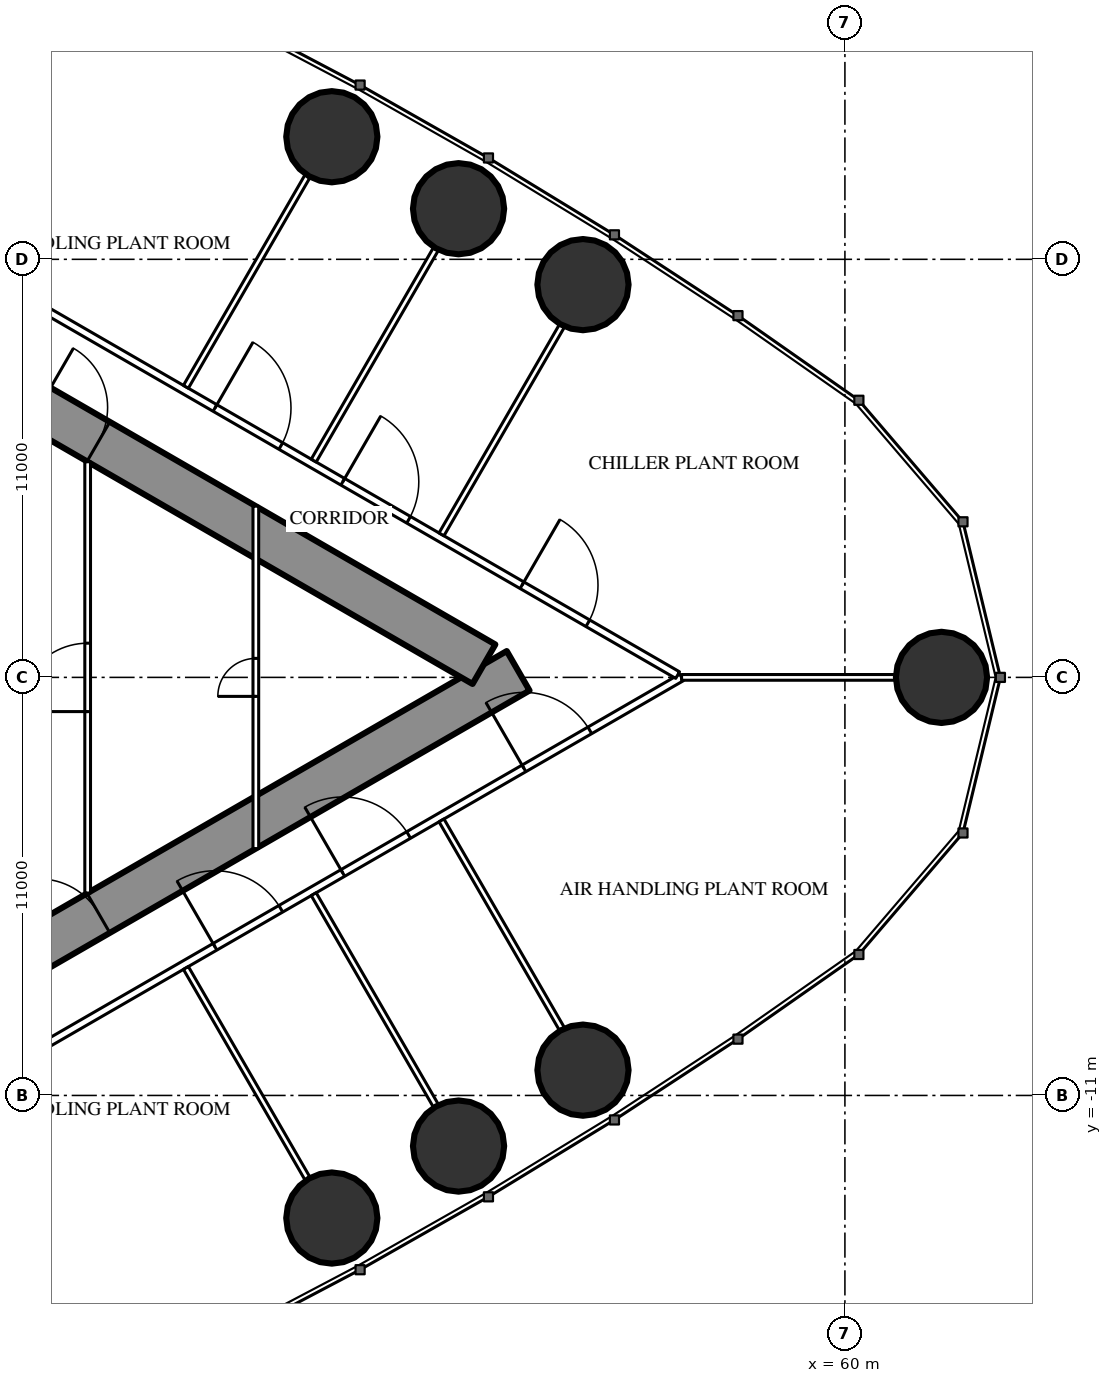
"""IFC4 building model, lengths in metres.
Left out: names, types, materials, properties, quantities, classifications, styles, units other than length and angle.
Written with IfcOpenShell. Run it as: python <this file> out.ifc"""

import sys

from ifc_helpers import new_model, si_unit, direction, frame, frame_2d, origin, origin_2d, place, context, subcontext, project, spatial, rectangle, circle, extrude, element, fill, save


model = new_model("IFC4")
c1 = context("Model", 3, precision=1e-05, world=origin(), true_north=direction((0.0, 1.0)))
c2 = subcontext(c1, "Body", "Model", "MODEL_VIEW")
j1 = project(units=[si_unit("LENGTHUNIT", "METRE"), si_unit("PLANEANGLEUNIT", "RADIAN")], contexts=[c1])
p1 = place(None, origin())
s1 = spatial("IfcSite", under=j1, at=p1, CompositionType="ELEMENT")
p2 = place(p1, origin())
s2 = spatial("IfcBuilding", under=s1, at=p2, CompositionType="ELEMENT")
p3 = place(p2, frame((0.0, 0.0, 263.3)))
s3 = spatial("IfcBuildingStorey", under=s2, at=p3, CompositionType="ELEMENT", Elevation=263.3)
for number, where, z_axis, x_axis in (
    (1, (62.542, 0.0, 0.0), (0.0, 0.0, 1.0), (1.0, 0.0, 0.0)),
    (2, (53.108, 10.334, 0.0), (0.0, 0.0, 1.0), (1.0, 0.0, 0.0)),
    (3, (49.834, 12.332, 0.0), (0.0, 0.0, 1.0), (1.0, 0.0, 0.0)),
    (4, (46.499, 14.226, 0.0), (0.0, 0.0, 1.0), (1.0, 0.0, 0.0)),
    (5, (46.499, -14.226, 0.0), (0.0, 0.0, 1.0), (1.0, 0.0, 0.0)),
    (6, (49.834, -12.332, 0.0), (0.0, 0.0, 1.0), (1.0, 0.0, 0.0)),
    (7, (53.108, -10.334, 0.0), (0.0, 0.0, 1.0), (1.0, 0.0, 0.0)),
):
    element("IfcColumn", number, at=place(p3, frame(where, z_axis=z_axis, x_axis=x_axis)), inside=s3, PredefinedType="COLUMN", context=c2, shape_type="SweptSolid", body=[
        extrude(circle(Radius=1.2, at=origin_2d()), origin(), (0.0, 0.0, 1.0), 5.0),
    ])
p4 = place(p3, frame((27.2, -13.8, 0.0), z_axis=(0.0, 0.0, 1.0), x_axis=(0.866027159892, 0.499996958321, 0.0)))
e8 = element("IfcWall", 8, at=p4, inside=s3, PredefinedType="SHEAR", context=c2, shape_type="SweptSolid", body=[
    extrude(rectangle(XDim=27.947, YDim=1.2, at=frame_2d((13.973, 0.0))), origin(), (0.0, 0.0, 1.0), 5.0),
])
p5 = place(p4, frame((4.6, 0.0, 0.0)))
e9 = element("IfcOpeningElement", 9, at=p5, cuts=e8, PredefinedType="OPENING", context=c2, shape_type="SweptSolid", body=[
    extrude(rectangle(XDim=1.0, YDim=2.2, at=frame_2d((0.5, 1.1))), frame((0.0, 0.61, 0.0), z_axis=(0.0, -1.0, 0.0), x_axis=(1.0, 0.0, 0.0)), (0.0, 0.0, 1.0), 1.22),
])
p6 = place(p4, frame((13.395, 0.0, 0.0)))
e10 = element("IfcOpeningElement", 10, at=p6, cuts=e8, PredefinedType="OPENING", context=c2, shape_type="SweptSolid", body=[
    extrude(rectangle(XDim=1.8, YDim=2.2, at=frame_2d((0.9, 1.1))), frame((0.0, 0.61, 0.0), z_axis=(0.0, -1.0, 0.0), x_axis=(1.0, 0.0, 0.0)), (0.0, 0.0, 1.0), 1.22),
])
p7 = place(p3, frame((27.2, 13.8, 0.0), z_axis=(0.0, 0.0, 1.0), x_axis=(0.866024515034, -0.500001539357, 0.0)))
e11 = element("IfcWall", 11, at=p7, inside=s3, PredefinedType="SHEAR", context=c2, shape_type="SweptSolid", body=[
    extrude(rectangle(XDim=26.907, YDim=1.2, at=frame_2d((13.454, 0.0))), origin(), (0.0, 0.0, 1.0), 5.0),
])
p8 = place(p7, frame((4.6, 0.0, 0.0)))
e12 = element("IfcOpeningElement", 12, at=p8, cuts=e11, PredefinedType="OPENING", context=c2, shape_type="SweptSolid", body=[
    extrude(rectangle(XDim=1.0, YDim=2.2, at=frame_2d((0.5, 1.1))), frame((0.0, 0.61, 0.0), z_axis=(0.0, -1.0, 0.0), x_axis=(1.0, 0.0, 0.0)), (0.0, 0.0, 1.0), 1.22),
])
p9 = place(p7, frame((13.395, 0.0, 0.0)))
e13 = element("IfcOpeningElement", 13, at=p9, cuts=e11, PredefinedType="OPENING", context=c2, shape_type="SweptSolid", body=[
    extrude(rectangle(XDim=1.8, YDim=2.2, at=frame_2d((0.9, 1.1))), frame((0.0, 0.61, 0.0), z_axis=(0.0, -1.0, 0.0), x_axis=(1.0, 0.0, 0.0)), (0.0, 0.0, 1.0), 1.22),
])
p10 = place(p3, frame((28.959, -15.44, 0.0), z_axis=(0.0, 0.0, 1.0), x_axis=(0.866025227435, 0.500000305447, 0.0)))
e14 = element("IfcWall", 14, at=p10, inside=s3, PredefinedType="PARTITIONING", context=c2, shape_type="SweptSolid", body=[
    extrude(rectangle(XDim=30.88, YDim=0.2, at=frame_2d((15.44, 0.0))), origin(), (0.0, 0.0, 1.0), 4.75),
])
p11 = place(p10, frame((6.994, 0.0, 0.0)))
e15 = element("IfcOpeningElement", 15, at=p11, cuts=e14, PredefinedType="OPENING", context=c2, shape_type="SweptSolid", body=[
    extrude(rectangle(XDim=2.0, YDim=2.4, at=frame_2d((1.0, 1.2))), frame((0.0, 0.11, 0.0), z_axis=(0.0, -1.0, 0.0), x_axis=(1.0, 0.0, 0.0)), (0.0, 0.0, 1.0), 0.22),
])
p12 = place(p10, frame((16.704, 0.0, 0.0)))
e16 = element("IfcOpeningElement", 16, at=p12, cuts=e14, PredefinedType="OPENING", context=c2, shape_type="SweptSolid", body=[
    extrude(rectangle(XDim=2.0, YDim=2.4, at=frame_2d((1.0, 1.2))), frame((0.0, 0.11, 0.0), z_axis=(0.0, -1.0, 0.0), x_axis=(1.0, 0.0, 0.0)), (0.0, 0.0, 1.0), 0.22),
])
p13 = place(p10, frame((20.587, 0.0, 0.0)))
e17 = element("IfcOpeningElement", 17, at=p13, cuts=e14, PredefinedType="OPENING", context=c2, shape_type="SweptSolid", body=[
    extrude(rectangle(XDim=2.0, YDim=2.4, at=frame_2d((1.0, 1.2))), frame((0.0, 0.11, 0.0), z_axis=(0.0, -1.0, 0.0), x_axis=(1.0, 0.0, 0.0)), (0.0, 0.0, 1.0), 0.22),
])
p14 = place(p10, frame((26.092, 0.0, 0.0)))
e18 = element("IfcOpeningElement", 18, at=p14, cuts=e14, PredefinedType="OPENING", context=c2, shape_type="SweptSolid", body=[
    extrude(rectangle(XDim=2.0, YDim=2.4, at=frame_2d((1.0, 1.2))), frame((0.0, 0.11, 0.0), z_axis=(0.0, -1.0, 0.0), x_axis=(1.0, 0.0, 0.0)), (0.0, 0.0, 1.0), 0.22),
])
p15 = place(p3, frame((28.959, 15.44, 0.0), z_axis=(0.0, 0.0, 1.0), x_axis=(0.866027378611, -0.499996579484, 0.0)))
e19 = element("IfcWall", 19, at=p15, inside=s3, PredefinedType="PARTITIONING", context=c2, shape_type="SweptSolid", body=[
    extrude(rectangle(XDim=30.76, YDim=0.2, at=frame_2d((15.38, 0.0))), origin(), (0.0, 0.0, 1.0), 4.75),
])
p16 = place(p15, frame((26.032, 0.0, 0.0)))
e20 = element("IfcOpeningElement", 20, at=p16, cuts=e19, PredefinedType="OPENING", context=c2, shape_type="SweptSolid", body=[
    extrude(rectangle(XDim=2.0, YDim=2.4, at=frame_2d((1.0, 1.2))), frame((0.0, 0.11, 0.0), z_axis=(0.0, -1.0, 0.0), x_axis=(1.0, 0.0, 0.0)), (0.0, 0.0, 1.0), 0.22),
])
p17 = place(p15, frame((20.587, 0.0, 0.0)))
e21 = element("IfcOpeningElement", 21, at=p17, cuts=e19, PredefinedType="OPENING", context=c2, shape_type="SweptSolid", body=[
    extrude(rectangle(XDim=2.0, YDim=2.4, at=frame_2d((1.0, 1.2))), frame((0.0, 0.11, 0.0), z_axis=(0.0, -1.0, 0.0), x_axis=(1.0, 0.0, 0.0)), (0.0, 0.0, 1.0), 0.22),
])
p18 = place(p15, frame((16.704, 0.0, 0.0)))
e22 = element("IfcOpeningElement", 22, at=p18, cuts=e19, PredefinedType="OPENING", context=c2, shape_type="SweptSolid", body=[
    extrude(rectangle(XDim=2.0, YDim=2.4, at=frame_2d((1.0, 1.2))), frame((0.0, 0.11, 0.0), z_axis=(0.0, -1.0, 0.0), x_axis=(1.0, 0.0, 0.0)), (0.0, 0.0, 1.0), 0.22),
])
p19 = place(p15, frame((6.994, 0.0, 0.0)))
e23 = element("IfcOpeningElement", 23, at=p19, cuts=e19, PredefinedType="OPENING", context=c2, shape_type="SweptSolid", body=[
    extrude(rectangle(XDim=2.0, YDim=2.4, at=frame_2d((1.0, 1.2))), frame((0.0, 0.11, 0.0), z_axis=(0.0, -1.0, 0.0), x_axis=(1.0, 0.0, 0.0)), (0.0, 0.0, 1.0), 0.22),
])
p20 = place(p3, frame((42.66, -7.646, 0.0), z_axis=(0.0, 0.0, 1.0), x_axis=(0.499996592859, -0.866027370889, 0.0)))
e24 = element("IfcWall", 24, at=p20, inside=s3, PredefinedType="PARTITIONING", context=c2, shape_type="SweptSolid", body=[
    extrude(rectangle(XDim=6.398, YDim=0.15, at=frame_2d((3.199, 0.0))), origin(), (0.0, 0.0, 1.0), 3.85),
])
p21 = place(p3, frame((46.023, -5.704, 0.0), z_axis=(0.0, 0.0, 1.0), x_axis=(0.499984478165, -0.866034365135, 0.0)))
e25 = element("IfcWall", 25, at=p21, inside=s3, PredefinedType="PARTITIONING", context=c2, shape_type="SweptSolid", body=[
    extrude(rectangle(XDim=6.426, YDim=0.15, at=frame_2d((3.213, 0.0))), origin(), (0.0, 0.0, 1.0), 3.85),
])
p22 = place(p3, frame((49.385, -3.763, 0.0), z_axis=(0.0, 0.0, 1.0), x_axis=(0.499999447814, -0.866025722589, 0.0)))
e26 = element("IfcWall", 26, at=p22, inside=s3, PredefinedType="PARTITIONING", context=c2, shape_type="SweptSolid", body=[
    extrude(rectangle(XDim=6.333, YDim=0.15, at=frame_2d((3.166, 0.0))), origin(), (0.0, 0.0, 1.0), 3.85),
])
p23 = place(p3, frame((42.66, 7.646, 0.0), z_axis=(0.0, 0.0, 1.0), x_axis=(0.499996592859, 0.866027370889, 0.0)))
e27 = element("IfcWall", 27, at=p23, inside=s3, PredefinedType="PARTITIONING", context=c2, shape_type="SweptSolid", body=[
    extrude(rectangle(XDim=6.398, YDim=0.15, at=frame_2d((3.199, 0.0))), origin(), (0.0, 0.0, 1.0), 3.85),
])
p24 = place(p3, frame((46.023, 5.704, 0.0), z_axis=(0.0, 0.0, 1.0), x_axis=(0.499984478165, 0.866034365135, 0.0)))
e28 = element("IfcWall", 28, at=p24, inside=s3, PredefinedType="PARTITIONING", context=c2, shape_type="SweptSolid", body=[
    extrude(rectangle(XDim=6.426, YDim=0.15, at=frame_2d((3.213, 0.0))), origin(), (0.0, 0.0, 1.0), 3.85),
])
p25 = place(p3, frame((49.385, 3.763, 0.0), z_axis=(0.0, 0.0, 1.0), x_axis=(0.499999447814, 0.866025722589, 0.0)))
e29 = element("IfcWall", 29, at=p25, inside=s3, PredefinedType="PARTITIONING", context=c2, shape_type="SweptSolid", body=[
    extrude(rectangle(XDim=6.333, YDim=0.15, at=frame_2d((3.166, 0.0))), origin(), (0.0, 0.0, 1.0), 3.85),
])
p26 = place(p3, frame((55.702, 0.0, 0.0), z_axis=(0.0, 0.0, 1.0), x_axis=(1.0, 0.0, 0.0)))
e30 = element("IfcWall", 30, at=p26, inside=s3, PredefinedType="PARTITIONING", context=c2, shape_type="SweptSolid", body=[
    extrude(rectangle(XDim=5.619, YDim=0.15, at=frame_2d((2.81, 0.0))), origin(), (0.0, 0.0, 1.0), 3.85),
])
p27 = place(p3, frame((40.075, -5.674, 0.0), z_axis=(0.0, 0.0, 1.0), x_axis=(0.0, 1.0, 0.0)))
e31 = element("IfcWall", 31, at=p27, inside=s3, PredefinedType="PARTITIONING", context=c2, shape_type="SweptSolid", body=[
    extrude(rectangle(XDim=11.348, YDim=0.15, at=frame_2d((5.674, 0.0))), origin(), (0.0, 0.0, 1.0), 4.75),
])
p28 = place(p27, frame((4.774, 0.0, 0.0)))
e32 = element("IfcOpeningElement", 32, at=p28, cuts=e31, PredefinedType="OPENING", context=c2, shape_type="SweptSolid", body=[
    extrude(rectangle(XDim=1.8, YDim=2.2, at=frame_2d((0.9, 1.1))), frame((0.0, 0.085, 0.0), z_axis=(0.0, -1.0, 0.0), x_axis=(1.0, 0.0, 0.0)), (0.0, 0.0, 1.0), 0.17),
])
p29 = place(p3, frame((44.5, -4.505, 0.0), z_axis=(0.0, 0.0, 1.0), x_axis=(0.0, 1.0, 0.0)))
e33 = element("IfcWall", 33, at=p29, inside=s3, PredefinedType="PARTITIONING", context=c2, shape_type="SweptSolid", body=[
    extrude(rectangle(XDim=9.009, YDim=0.15, at=frame_2d((4.505, 0.0))), origin(), (0.0, 0.0, 1.0), 4.75),
])
p30 = place(p29, frame((4.005, 0.0, 0.0)))
e34 = element("IfcOpeningElement", 34, at=p30, cuts=e33, PredefinedType="OPENING", context=c2, shape_type="SweptSolid", body=[
    extrude(rectangle(XDim=1.0, YDim=2.2, at=frame_2d((0.5, 1.1))), frame((0.0, 0.085, 0.0), z_axis=(0.0, -1.0, 0.0), x_axis=(1.0, 0.0, 0.0)), (0.0, 0.0, 1.0), 0.17),
])
p31 = place(p12, origin())
e35 = element("IfcDoor", 35, at=p31, inside=s3, OperationType="DOUBLE_DOOR_SINGLE_SWING", PredefinedType="DOOR", context=c2, shape_type="SweptSolid", body=[
    extrude(rectangle(XDim=2.0, YDim=2.4, at=frame_2d((1.0, 1.2))), frame((0.0, 0.025, 0.0), z_axis=(0.0, -1.0, 0.0), x_axis=(1.0, 0.0, 0.0)), (0.0, 0.0, 1.0), 0.05),
])
fill(e16, e35)
p32 = place(p13, origin())
e36 = element("IfcDoor", 36, at=p32, inside=s3, OperationType="DOUBLE_DOOR_SINGLE_SWING", PredefinedType="DOOR", context=c2, shape_type="SweptSolid", body=[
    extrude(rectangle(XDim=2.0, YDim=2.4, at=frame_2d((1.0, 1.2))), frame((0.0, 0.025, 0.0), z_axis=(0.0, -1.0, 0.0), x_axis=(1.0, 0.0, 0.0)), (0.0, 0.0, 1.0), 0.05),
])
fill(e17, e36)
p33 = place(p14, origin())
e37 = element("IfcDoor", 37, at=p33, inside=s3, OperationType="DOUBLE_DOOR_SINGLE_SWING", PredefinedType="DOOR", context=c2, shape_type="SweptSolid", body=[
    extrude(rectangle(XDim=2.0, YDim=2.4, at=frame_2d((1.0, 1.2))), frame((0.0, 0.025, 0.0), z_axis=(0.0, -1.0, 0.0), x_axis=(1.0, 0.0, 0.0)), (0.0, 0.0, 1.0), 0.05),
])
fill(e18, e37)
p34 = place(p16, origin())
e38 = element("IfcDoor", 38, at=p34, inside=s3, OperationType="DOUBLE_DOOR_SINGLE_SWING", PredefinedType="DOOR", context=c2, shape_type="SweptSolid", body=[
    extrude(rectangle(XDim=2.0, YDim=2.4, at=frame_2d((1.0, 1.2))), frame((0.0, 0.025, 0.0), z_axis=(0.0, -1.0, 0.0), x_axis=(1.0, 0.0, 0.0)), (0.0, 0.0, 1.0), 0.05),
])
fill(e20, e38)
p35 = place(p17, origin())
e39 = element("IfcDoor", 39, at=p35, inside=s3, OperationType="DOUBLE_DOOR_SINGLE_SWING", PredefinedType="DOOR", context=c2, shape_type="SweptSolid", body=[
    extrude(rectangle(XDim=2.0, YDim=2.4, at=frame_2d((1.0, 1.2))), frame((0.0, 0.025, 0.0), z_axis=(0.0, -1.0, 0.0), x_axis=(1.0, 0.0, 0.0)), (0.0, 0.0, 1.0), 0.05),
])
fill(e21, e39)
p36 = place(p18, origin())
e40 = element("IfcDoor", 40, at=p36, inside=s3, OperationType="DOUBLE_DOOR_SINGLE_SWING", PredefinedType="DOOR", context=c2, shape_type="SweptSolid", body=[
    extrude(rectangle(XDim=2.0, YDim=2.4, at=frame_2d((1.0, 1.2))), frame((0.0, 0.025, 0.0), z_axis=(0.0, -1.0, 0.0), x_axis=(1.0, 0.0, 0.0)), (0.0, 0.0, 1.0), 0.05),
])
fill(e22, e40)
p37 = place(p28, origin())
e41 = element("IfcDoor", 41, at=p37, inside=s3, OperationType="DOUBLE_DOOR_SINGLE_SWING", PredefinedType="DOOR", context=c2, shape_type="SweptSolid", body=[
    extrude(rectangle(XDim=1.8, YDim=2.2, at=frame_2d((0.9, 1.1))), frame((0.0, 0.025, 0.0), z_axis=(0.0, -1.0, 0.0), x_axis=(1.0, 0.0, 0.0)), (0.0, 0.0, 1.0), 0.05),
])
fill(e32, e41)
p38 = place(p30, origin())
e42 = element("IfcDoor", 42, at=p38, inside=s3, OperationType="SINGLE_SWING_LEFT", PredefinedType="DOOR", context=c2, shape_type="SweptSolid", body=[
    extrude(rectangle(XDim=1.0, YDim=2.2, at=frame_2d((0.5, 1.1))), frame((0.0, 0.025, 0.0), z_axis=(0.0, -1.0, 0.0), x_axis=(1.0, 0.0, 0.0)), (0.0, 0.0, 1.0), 0.05),
])
fill(e34, e42)
p39 = place(p6, origin())
e43 = element("IfcDoor", 43, at=p39, inside=s3, OperationType="DOUBLE_DOOR_SINGLE_SWING", PredefinedType="DOOR", context=c2, shape_type="SweptSolid", body=[
    extrude(rectangle(XDim=1.8, YDim=2.2, at=frame_2d((0.9, 1.1))), frame((0.0, 0.025, 0.0), z_axis=(0.0, -1.0, 0.0), x_axis=(1.0, 0.0, 0.0)), (0.0, 0.0, 1.0), 0.05),
])
fill(e10, e43)
p40 = place(p9, origin())
e44 = element("IfcDoor", 44, at=p40, inside=s3, OperationType="DOUBLE_DOOR_SINGLE_SWING", PredefinedType="DOOR", context=c2, shape_type="SweptSolid", body=[
    extrude(rectangle(XDim=1.8, YDim=2.2, at=frame_2d((0.9, 1.1))), frame((0.0, 0.025, 0.0), z_axis=(0.0, -1.0, 0.0), x_axis=(1.0, 0.0, 0.0)), (0.0, 0.0, 1.0), 0.05),
])
fill(e13, e44)
save(model, sys.argv[1])
